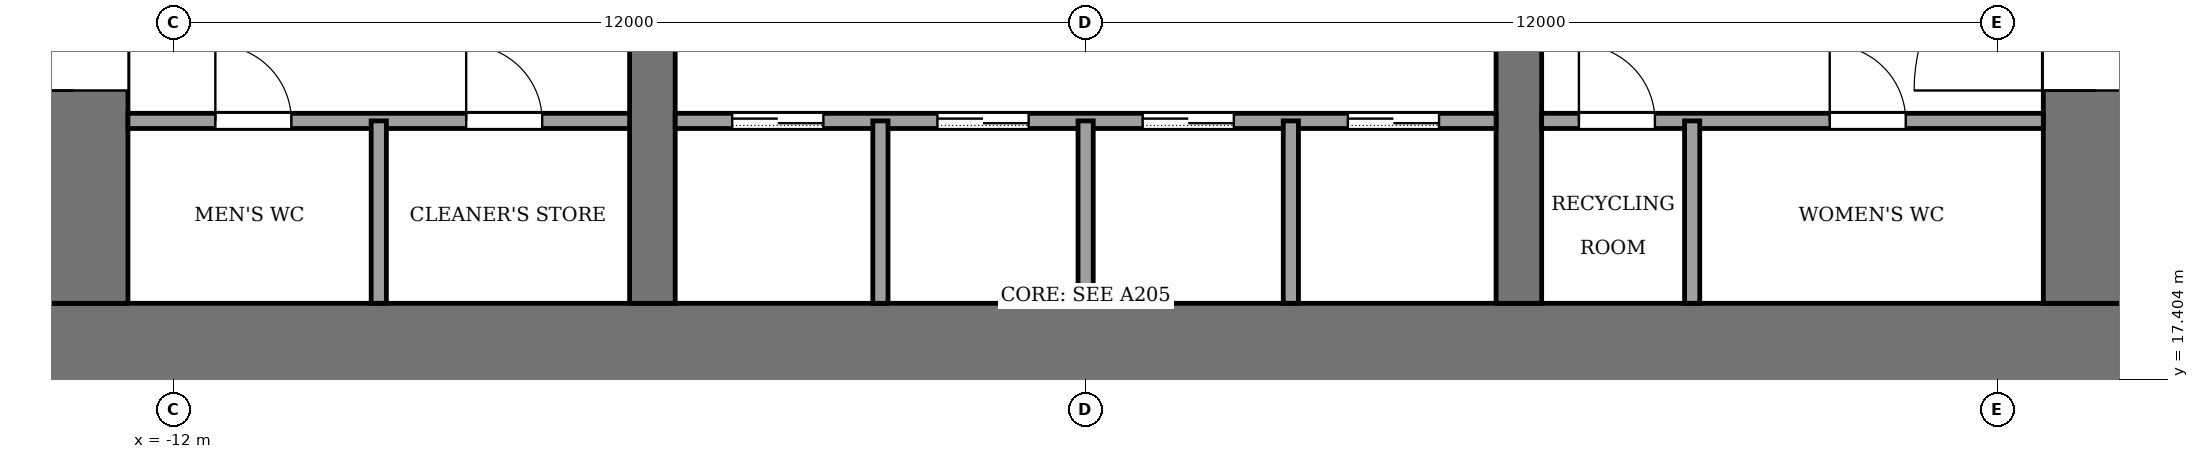
"""IFC4 building model, lengths in metres.
Left out: names, types, materials, properties, quantities, classifications, styles, units other than length and angle.
Written with IfcOpenShell. Run it as: python <this file> out.ifc"""

import sys

from ifc_helpers import new_model, si_unit, direction, frame, frame_2d, origin, place, context, subcontext, project, spatial, rectangle, extrude, element, fill, save


model = new_model("IFC4")
c1 = context("Model", 3, precision=1e-05, world=origin(), true_north=direction((0.0, 1.0)))
c2 = subcontext(c1, "Body", "Model", "MODEL_VIEW")
j1 = project(units=[si_unit("LENGTHUNIT", "METRE"), si_unit("PLANEANGLEUNIT", "RADIAN")], contexts=[c1])
p1 = place(None, origin())
s1 = spatial("IfcSite", under=j1, at=p1, CompositionType="ELEMENT")
p2 = place(p1, origin())
s2 = spatial("IfcBuilding", under=s1, at=p2, CompositionType="ELEMENT")
p3 = place(p2, frame((0.0, 0.0, 18.0)))
s3 = spatial("IfcBuildingStorey", under=s2, at=p3, CompositionType="ELEMENT", Elevation=18.0)
p4 = place(p3, frame((-14.0, 17.7, -0.13), z_axis=(0.0, 0.0, 1.0), x_axis=(1.0, 0.0, 0.0)))
e1 = element("IfcWall", 1, at=p4, inside=s3, PredefinedType="SHEAR", context=c2, shape_type="SweptSolid", body=[
    extrude(rectangle(XDim=28.0, YDim=1.4, at=frame_2d((14.0, 0.0))), origin(), (0.0, 0.0, 1.0), 4.0),
])
p5 = place(p3, frame((-13.3, 18.4, -0.13), z_axis=(0.0, 0.0, 1.0), x_axis=(0.0, 1.0, 0.0)))
e2 = element("IfcWall", 2, at=p5, inside=s3, PredefinedType="SHEAR", context=c2, shape_type="SweptSolid", body=[
    extrude(rectangle(XDim=19.2, YDim=1.4, at=frame_2d((9.6, 0.0))), origin(), (0.0, 0.0, 1.0), 4.0),
])
p6 = place(p5, frame((2.8, 0.0, 0.13)))
e3 = element("IfcOpeningElement", 3, at=p6, cuts=e2, PredefinedType="OPENING", context=c2, shape_type="SweptSolid", body=[
    extrude(rectangle(XDim=2.4, YDim=2.4, at=frame_2d((1.2, 1.2))), frame((0.0, 0.71, 0.0), z_axis=(0.0, -1.0, 0.0), x_axis=(1.0, 0.0, 0.0)), (0.0, 0.0, 1.0), 1.42),
])
p7 = place(p5, frame((13.4, 0.0, 0.13)))
e4 = element("IfcOpeningElement", 4, at=p7, cuts=e2, PredefinedType="OPENING", context=c2, shape_type="SweptSolid", body=[
    extrude(rectangle(XDim=1.4, YDim=2.2, at=frame_2d((0.7, 1.1))), frame((0.0, 0.71, 0.0), z_axis=(0.0, -1.0, 0.0), x_axis=(1.0, 0.0, 0.0)), (0.0, 0.0, 1.0), 1.42),
])
p8 = place(p3, frame((13.3, 18.4, -0.13), z_axis=(0.0, 0.0, 1.0), x_axis=(0.0, 1.0, 0.0)))
e5 = element("IfcWall", 5, at=p8, inside=s3, PredefinedType="SHEAR", context=c2, shape_type="SweptSolid", body=[
    extrude(rectangle(XDim=19.2, YDim=1.4, at=frame_2d((9.6, 0.0))), origin(), (0.0, 0.0, 1.0), 4.0),
])
p9 = place(p8, frame((2.8, 0.0, 0.13)))
e6 = element("IfcOpeningElement", 6, at=p9, cuts=e5, PredefinedType="OPENING", context=c2, shape_type="SweptSolid", body=[
    extrude(rectangle(XDim=2.4, YDim=2.4, at=frame_2d((1.2, 1.2))), frame((0.0, 0.71, 0.0), z_axis=(0.0, -1.0, 0.0), x_axis=(1.0, 0.0, 0.0)), (0.0, 0.0, 1.0), 1.42),
])
p10 = place(p8, frame((13.3, 0.0, 0.13)))
e7 = element("IfcOpeningElement", 7, at=p10, cuts=e5, PredefinedType="OPENING", context=c2, shape_type="SweptSolid", body=[
    extrude(rectangle(XDim=2.4, YDim=2.4, at=frame_2d((1.2, 1.2))), frame((0.0, 0.71, 0.0), z_axis=(0.0, -1.0, 0.0), x_axis=(1.0, 0.0, 0.0)), (0.0, 0.0, 1.0), 1.42),
])
p11 = place(p3, frame((-5.7, 18.4, -0.13), z_axis=(0.0, 0.0, 1.0), x_axis=(0.0, 1.0, 0.0)))
e8 = element("IfcWall", 8, at=p11, inside=s3, PredefinedType="SHEAR", context=c2, shape_type="SweptSolid", body=[
    extrude(rectangle(XDim=19.2, YDim=0.6, at=frame_2d((9.6, 0.0))), origin(), (0.0, 0.0, 1.0), 4.0),
])
p12 = place(p11, frame((8.35, 0.0, 0.13)))
e9 = element("IfcOpeningElement", 9, at=p12, cuts=e8, PredefinedType="OPENING", context=c2, shape_type="SweptSolid", body=[
    extrude(rectangle(XDim=0.9, YDim=2.1, at=frame_2d((0.45, 1.05))), frame((0.0, 0.31, 0.0), z_axis=(0.0, -1.0, 0.0), x_axis=(1.0, 0.0, 0.0)), (0.0, 0.0, 1.0), 0.62),
])
p13 = place(p3, frame((5.7, 18.4, -0.13), z_axis=(0.0, 0.0, 1.0), x_axis=(0.0, 1.0, 0.0)))
e10 = element("IfcWall", 10, at=p13, inside=s3, PredefinedType="SHEAR", context=c2, shape_type="SweptSolid", body=[
    extrude(rectangle(XDim=19.2, YDim=0.6, at=frame_2d((9.6, 0.0))), origin(), (0.0, 0.0, 1.0), 4.0),
])
p14 = place(p13, frame((8.35, 0.0, 0.13)))
e11 = element("IfcOpeningElement", 11, at=p14, cuts=e10, PredefinedType="OPENING", context=c2, shape_type="SweptSolid", body=[
    extrude(rectangle(XDim=0.9, YDim=2.1, at=frame_2d((0.45, 1.05))), frame((0.0, 0.31, 0.0), z_axis=(0.0, -1.0, 0.0), x_axis=(1.0, 0.0, 0.0)), (0.0, 0.0, 1.0), 0.62),
])
p15 = place(p13, frame((13.3, 0.0, 0.13)))
e12 = element("IfcOpeningElement", 12, at=p15, cuts=e10, PredefinedType="OPENING", context=c2, shape_type="SweptSolid", body=[
    extrude(rectangle(XDim=2.4, YDim=2.4, at=frame_2d((1.2, 1.2))), frame((0.0, 0.31, 0.0), z_axis=(0.0, -1.0, 0.0), x_axis=(1.0, 0.0, 0.0)), (0.0, 0.0, 1.0), 0.62),
])
p16 = place(p3, frame((-12.6, 20.8, 0.0), z_axis=(0.0, 0.0, 1.0), x_axis=(1.0, 0.0, 0.0)))
e13 = element("IfcWall", 13, at=p16, inside=s3, PredefinedType="PARTITIONING", context=c2, shape_type="SweptSolid", body=[
    extrude(rectangle(XDim=6.6, YDim=0.2, at=frame_2d((3.3, 0.0))), origin(), (0.0, 0.0, 1.0), 3.87),
])
p17 = place(p16, frame((1.15, 0.0, 0.0)))
e14 = element("IfcOpeningElement", 14, at=p17, cuts=e13, PredefinedType="OPENING", context=c2, shape_type="SweptSolid", body=[
    extrude(rectangle(XDim=1.0, YDim=2.1, at=frame_2d((0.5, 1.05))), frame((0.0, 0.11, 0.0), z_axis=(0.0, -1.0, 0.0), x_axis=(1.0, 0.0, 0.0)), (0.0, 0.0, 1.0), 0.22),
])
p18 = place(p16, frame((4.45, 0.0, 0.0)))
e15 = element("IfcOpeningElement", 15, at=p18, cuts=e13, PredefinedType="OPENING", context=c2, shape_type="SweptSolid", body=[
    extrude(rectangle(XDim=1.0, YDim=2.1, at=frame_2d((0.5, 1.05))), frame((0.0, 0.11, 0.0), z_axis=(0.0, -1.0, 0.0), x_axis=(1.0, 0.0, 0.0)), (0.0, 0.0, 1.0), 0.22),
])
p19 = place(p3, frame((-5.4, 20.8, 0.0), z_axis=(0.0, 0.0, 1.0), x_axis=(1.0, 0.0, 0.0)))
e16 = element("IfcWall", 16, at=p19, inside=s3, PredefinedType="PARTITIONING", context=c2, shape_type="SweptSolid", body=[
    extrude(rectangle(XDim=10.8, YDim=0.2, at=frame_2d((5.4, 0.0))), origin(), (0.0, 0.0, 1.0), 3.87),
])
p20 = place(p19, frame((0.75, 0.0, 0.0)))
e17 = element("IfcOpeningElement", 17, at=p20, cuts=e16, PredefinedType="OPENING", context=c2, shape_type="SweptSolid", body=[
    extrude(rectangle(XDim=1.2, YDim=2.2, at=frame_2d((0.6, 1.1))), frame((0.0, 0.11, 0.0), z_axis=(0.0, -1.0, 0.0), x_axis=(1.0, 0.0, 0.0)), (0.0, 0.0, 1.0), 0.22),
])
p21 = place(p19, frame((3.45, 0.0, 0.0)))
e18 = element("IfcOpeningElement", 18, at=p21, cuts=e16, PredefinedType="OPENING", context=c2, shape_type="SweptSolid", body=[
    extrude(rectangle(XDim=1.2, YDim=2.2, at=frame_2d((0.6, 1.1))), frame((0.0, 0.11, 0.0), z_axis=(0.0, -1.0, 0.0), x_axis=(1.0, 0.0, 0.0)), (0.0, 0.0, 1.0), 0.22),
])
p22 = place(p19, frame((6.15, 0.0, 0.0)))
e19 = element("IfcOpeningElement", 19, at=p22, cuts=e16, PredefinedType="OPENING", context=c2, shape_type="SweptSolid", body=[
    extrude(rectangle(XDim=1.2, YDim=2.2, at=frame_2d((0.6, 1.1))), frame((0.0, 0.11, 0.0), z_axis=(0.0, -1.0, 0.0), x_axis=(1.0, 0.0, 0.0)), (0.0, 0.0, 1.0), 0.22),
])
p23 = place(p19, frame((8.85, 0.0, 0.0)))
e20 = element("IfcOpeningElement", 20, at=p23, cuts=e16, PredefinedType="OPENING", context=c2, shape_type="SweptSolid", body=[
    extrude(rectangle(XDim=1.2, YDim=2.2, at=frame_2d((0.6, 1.1))), frame((0.0, 0.11, 0.0), z_axis=(0.0, -1.0, 0.0), x_axis=(1.0, 0.0, 0.0)), (0.0, 0.0, 1.0), 0.22),
])
p24 = place(p3, frame((6.0, 20.8, 0.0), z_axis=(0.0, 0.0, 1.0), x_axis=(1.0, 0.0, 0.0)))
e21 = element("IfcWall", 21, at=p24, inside=s3, PredefinedType="PARTITIONING", context=c2, shape_type="SweptSolid", body=[
    extrude(rectangle(XDim=6.6, YDim=0.2, at=frame_2d((3.3, 0.0))), origin(), (0.0, 0.0, 1.0), 3.87),
])
p25 = place(p24, frame((0.49, 0.0, 0.0)))
e22 = element("IfcOpeningElement", 22, at=p25, cuts=e21, PredefinedType="OPENING", context=c2, shape_type="SweptSolid", body=[
    extrude(rectangle(XDim=1.0, YDim=2.1, at=frame_2d((0.5, 1.05))), frame((0.0, 0.11, 0.0), z_axis=(0.0, -1.0, 0.0), x_axis=(1.0, 0.0, 0.0)), (0.0, 0.0, 1.0), 0.22),
])
p26 = place(p24, frame((3.79, 0.0, 0.0)))
e23 = element("IfcOpeningElement", 23, at=p26, cuts=e21, PredefinedType="OPENING", context=c2, shape_type="SweptSolid", body=[
    extrude(rectangle(XDim=1.0, YDim=2.1, at=frame_2d((0.5, 1.05))), frame((0.0, 0.11, 0.0), z_axis=(0.0, -1.0, 0.0), x_axis=(1.0, 0.0, 0.0)), (0.0, 0.0, 1.0), 0.22),
])
for number, where, z_axis, x_axis in (
    (24, (-9.3, 18.4, 0.0), (0.0, 0.0, 1.0), (0.0, 1.0, 0.0)),
    (25, (-2.7, 18.4, 0.0), (0.0, 0.0, 1.0), (0.0, 1.0, 0.0)),
    (26, (0.0, 18.4, 0.0), (0.0, 0.0, 1.0), (0.0, 1.0, 0.0)),
    (27, (2.7, 18.4, 0.0), (0.0, 0.0, 1.0), (0.0, 1.0, 0.0)),
    (28, (7.98, 18.4, 0.0), (0.0, 0.0, 1.0), (0.0, 1.0, 0.0)),
):
    element("IfcWall", number, at=place(p3, frame(where, z_axis=z_axis, x_axis=x_axis)), inside=s3, PredefinedType="PARTITIONING", context=c2, shape_type="SweptSolid", body=[
        extrude(rectangle(XDim=2.4, YDim=0.2, at=frame_2d((1.2, 0.0))), origin(), (0.0, 0.0, 1.0), 3.87),
    ])
p27 = place(p20, origin())
e29 = element("IfcDoor", 29, at=p27, inside=s3, OperationType="SLIDING_TO_LEFT", PredefinedType="DOOR", context=c2, shape_type="SweptSolid", body=[
    extrude(rectangle(XDim=1.2, YDim=2.2, at=frame_2d((0.6, 1.1))), frame((0.0, 0.025, 0.0), z_axis=(0.0, -1.0, 0.0), x_axis=(1.0, 0.0, 0.0)), (0.0, 0.0, 1.0), 0.05),
])
fill(e17, e29)
p28 = place(p21, origin())
e30 = element("IfcDoor", 30, at=p28, inside=s3, OperationType="SLIDING_TO_LEFT", PredefinedType="DOOR", context=c2, shape_type="SweptSolid", body=[
    extrude(rectangle(XDim=1.2, YDim=2.2, at=frame_2d((0.6, 1.1))), frame((0.0, 0.025, 0.0), z_axis=(0.0, -1.0, 0.0), x_axis=(1.0, 0.0, 0.0)), (0.0, 0.0, 1.0), 0.05),
])
fill(e18, e30)
p29 = place(p22, origin())
e31 = element("IfcDoor", 31, at=p29, inside=s3, OperationType="SLIDING_TO_LEFT", PredefinedType="DOOR", context=c2, shape_type="SweptSolid", body=[
    extrude(rectangle(XDim=1.2, YDim=2.2, at=frame_2d((0.6, 1.1))), frame((0.0, 0.025, 0.0), z_axis=(0.0, -1.0, 0.0), x_axis=(1.0, 0.0, 0.0)), (0.0, 0.0, 1.0), 0.05),
])
fill(e19, e31)
p30 = place(p23, origin())
e32 = element("IfcDoor", 32, at=p30, inside=s3, OperationType="SLIDING_TO_LEFT", PredefinedType="DOOR", context=c2, shape_type="SweptSolid", body=[
    extrude(rectangle(XDim=1.2, YDim=2.2, at=frame_2d((0.6, 1.1))), frame((0.0, 0.025, 0.0), z_axis=(0.0, -1.0, 0.0), x_axis=(1.0, 0.0, 0.0)), (0.0, 0.0, 1.0), 0.05),
])
fill(e20, e32)
p31 = place(p17, origin())
e33 = element("IfcDoor", 33, at=p31, inside=s3, OperationType="SINGLE_SWING_LEFT", PredefinedType="DOOR", context=c2, shape_type="SweptSolid", body=[
    extrude(rectangle(XDim=1.0, YDim=2.1, at=frame_2d((0.5, 1.05))), frame((0.0, 0.025, 0.0), z_axis=(0.0, -1.0, 0.0), x_axis=(1.0, 0.0, 0.0)), (0.0, 0.0, 1.0), 0.05),
])
fill(e14, e33)
p32 = place(p18, origin())
e34 = element("IfcDoor", 34, at=p32, inside=s3, OperationType="SINGLE_SWING_LEFT", PredefinedType="DOOR", context=c2, shape_type="SweptSolid", body=[
    extrude(rectangle(XDim=1.0, YDim=2.1, at=frame_2d((0.5, 1.05))), frame((0.0, 0.025, 0.0), z_axis=(0.0, -1.0, 0.0), x_axis=(1.0, 0.0, 0.0)), (0.0, 0.0, 1.0), 0.05),
])
fill(e15, e34)
p33 = place(p25, origin())
e35 = element("IfcDoor", 35, at=p33, inside=s3, OperationType="SINGLE_SWING_RIGHT", PredefinedType="DOOR", context=c2, shape_type="SweptSolid", body=[
    extrude(rectangle(XDim=1.0, YDim=2.1, at=frame_2d((0.5, 1.05))), frame((0.0, 0.025, 0.0), z_axis=(0.0, -1.0, 0.0), x_axis=(1.0, 0.0, 0.0)), (0.0, 0.0, 1.0), 0.05),
])
fill(e22, e35)
p34 = place(p26, origin())
e36 = element("IfcDoor", 36, at=p34, inside=s3, OperationType="SINGLE_SWING_RIGHT", PredefinedType="DOOR", context=c2, shape_type="SweptSolid", body=[
    extrude(rectangle(XDim=1.0, YDim=2.1, at=frame_2d((0.5, 1.05))), frame((0.0, 0.025, 0.0), z_axis=(0.0, -1.0, 0.0), x_axis=(1.0, 0.0, 0.0)), (0.0, 0.0, 1.0), 0.05),
])
fill(e23, e36)
p35 = place(p6, origin())
e37 = element("IfcDoor", 37, at=p35, inside=s3, OperationType="DOUBLE_DOOR_SINGLE_SWING", PredefinedType="DOOR", context=c2, shape_type="SweptSolid", body=[
    extrude(rectangle(XDim=2.4, YDim=2.4, at=frame_2d((1.2, 1.2))), frame((0.0, 0.025, 0.0), z_axis=(0.0, -1.0, 0.0), x_axis=(1.0, 0.0, 0.0)), (0.0, 0.0, 1.0), 0.05),
])
fill(e3, e37)
p36 = place(p9, origin())
e38 = element("IfcDoor", 38, at=p36, inside=s3, OperationType="DOUBLE_DOOR_SINGLE_SWING", PredefinedType="DOOR", context=c2, shape_type="SweptSolid", body=[
    extrude(rectangle(XDim=2.4, YDim=2.4, at=frame_2d((1.2, 1.2))), frame((0.0, 0.025, 0.0), z_axis=(0.0, -1.0, 0.0), x_axis=(1.0, 0.0, 0.0)), (0.0, 0.0, 1.0), 0.05),
])
fill(e6, e38)
save(model, sys.argv[1])
